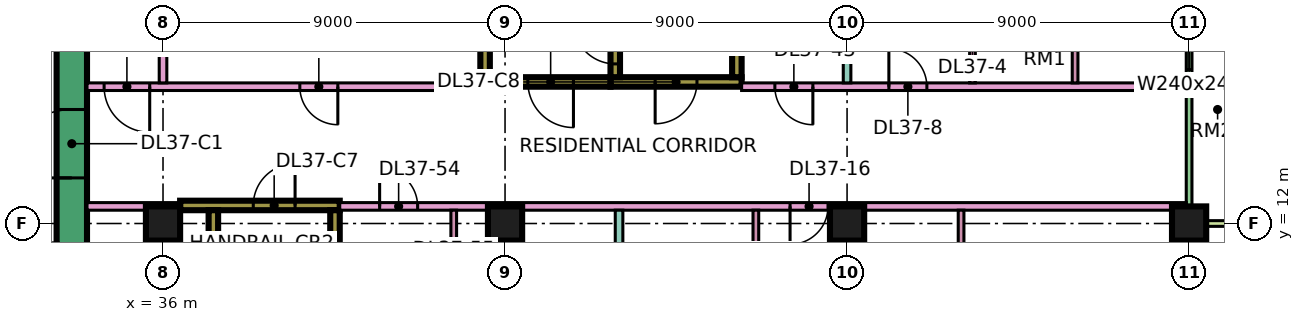
"""IFC4 building model, lengths in metres.
Left out: names, types, materials, properties, quantities, classifications, styles, units other than length and angle.
Written with IfcOpenShell. Run it as: python <this file> out.ifc"""

import sys

from ifc_helpers import new_model, si_unit, direction, frame, frame_2d, origin, origin_2d, place, context, subcontext, project, spatial, rectangle, extrude, element, fill, save


model = new_model("IFC4")
c1 = context("Model", 3, precision=1e-05, world=origin(), true_north=direction((0.0, 1.0)))
c2 = subcontext(c1, "Body", "Model", "MODEL_VIEW")
j1 = project(units=[si_unit("LENGTHUNIT", "METRE"), si_unit("PLANEANGLEUNIT", "RADIAN")], contexts=[c1])
p1 = place(None, origin())
s1 = spatial("IfcSite", under=j1, at=p1, CompositionType="ELEMENT")
p2 = place(p1, origin())
s2 = spatial("IfcBuilding", under=s1, at=p2, CompositionType="ELEMENT")
p3 = place(p2, frame((0.0, 0.0, 164.9)))
s3 = spatial("IfcBuildingStorey", under=s2, at=p3, CompositionType="ELEMENT", Elevation=164.9)
for number, where, z_axis, x_axis in (
    (1, (36.0, 12.0, 0.0), (0.0, 0.0, 1.0), (1.0, 0.0, 0.0)),
    (2, (45.0, 12.0, 0.0), (0.0, 0.0, 1.0), (1.0, 0.0, 0.0)),
    (3, (54.0, 12.0, 0.0), (0.0, 0.0, 1.0), (1.0, 0.0, 0.0)),
    (4, (63.0, 12.0, 0.0), (0.0, 0.0, 1.0), (1.0, 0.0, 0.0)),
):
    element("IfcColumn", number, at=place(p3, frame(where, z_axis=z_axis, x_axis=x_axis)), inside=s3, PredefinedType="COLUMN", context=c2, shape_type="SweptSolid", body=[
        extrude(rectangle(XDim=0.9, YDim=0.9, at=origin_2d()), origin(), (0.0, 0.0, 1.0), 3.75),
    ])
p4 = place(p3, frame((33.6, 7.8, 0.0), z_axis=(0.0, 0.0, 1.0), x_axis=(0.0, 1.0, 0.0)))
e5 = element("IfcWall", 5, at=p4, inside=s3, PredefinedType="SHEAR", context=c2, shape_type="SweptSolid", body=[
    extrude(rectangle(XDim=11.4, YDim=0.8, at=frame_2d((5.7, 0.0))), origin(), (0.0, 0.0, 1.0), 3.75),
])
p5 = place(p4, frame((5.4, 0.0, 0.0)))
e6 = element("IfcOpeningElement", 6, at=p5, cuts=e5, PredefinedType="OPENING", context=c2, shape_type="SweptSolid", body=[
    extrude(rectangle(XDim=1.8, YDim=2.4, at=frame_2d((0.9, 1.2))), frame((0.0, 0.41, 0.0), z_axis=(0.0, -1.0, 0.0), x_axis=(1.0, 0.0, 0.0)), (0.0, 0.0, 1.0), 0.82),
])
p6 = place(p3, frame((36.45, 12.475, 0.0), z_axis=(0.0, 0.0, 1.0), x_axis=(1.0, 0.0, 0.0)))
e7 = element("IfcWall", 7, at=p6, inside=s3, PredefinedType="SHEAR", context=c2, shape_type="SweptSolid", body=[
    extrude(rectangle(XDim=4.2, YDim=0.25, at=frame_2d((2.1, 0.0))), origin(), (0.0, 0.0, 1.0), 3.75),
])
p7 = place(p6, frame((1.925, 0.0, 0.0)))
e8 = element("IfcOpeningElement", 8, at=p7, cuts=e7, PredefinedType="OPENING", context=c2, shape_type="SweptSolid", body=[
    extrude(rectangle(XDim=1.1, YDim=2.2, at=frame_2d((0.55, 1.1))), frame((0.0, 0.135, 0.0), z_axis=(0.0, -1.0, 0.0), x_axis=(1.0, 0.0, 0.0)), (0.0, 0.0, 1.0), 0.27),
])
for number, where, z_axis, x_axis in (
    (9, (37.325, 5.85, 0.0), (0.0, 0.0, 1.0), (0.0, 1.0, 0.0)),
    (10, (40.525, 5.85, 0.0), (0.0, 0.0, 1.0), (0.0, 1.0, 0.0)),
):
    element("IfcWall", number, at=place(p3, frame(where, z_axis=z_axis, x_axis=x_axis)), inside=s3, PredefinedType="SHEAR", context=c2, shape_type="SweptSolid", body=[
        extrude(rectangle(XDim=6.5, YDim=0.25, at=frame_2d((3.25, 0.0))), origin(), (0.0, 0.0, 1.0), 3.75),
    ])
p8 = place(p3, frame((47.775, 15.725, 0.0), z_axis=(0.0, 0.0, 1.0), x_axis=(1.0, 0.0, 0.0)))
e11 = element("IfcWall", 11, at=p8, inside=s3, PredefinedType="SHEAR", context=c2, shape_type="SweptSolid", body=[
    extrude(rectangle(XDim=3.45, YDim=0.25, at=frame_2d((1.725, 0.0))), origin(), (0.0, 0.0, 1.0), 3.75),
])
p9 = place(p8, frame((1.175, 0.0, 0.0)))
e12 = element("IfcOpeningElement", 12, at=p9, cuts=e11, PredefinedType="OPENING", context=c2, shape_type="SweptSolid", body=[
    extrude(rectangle(XDim=1.1, YDim=2.2, at=frame_2d((0.55, 1.1))), frame((0.0, 0.135, 0.0), z_axis=(0.0, -1.0, 0.0), x_axis=(1.0, 0.0, 0.0)), (0.0, 0.0, 1.0), 0.27),
])
p10 = place(p3, frame((47.9, 15.85, 0.0), z_axis=(0.0, 0.0, 1.0), x_axis=(0.0, 1.0, 0.0)))
e13 = element("IfcWall", 13, at=p10, inside=s3, PredefinedType="SHEAR", context=c2, shape_type="SweptSolid", body=[
    extrude(rectangle(XDim=6.5, YDim=0.25, at=frame_2d((3.25, 0.0))), origin(), (0.0, 0.0, 1.0), 3.75),
])
p11 = place(p10, frame((0.35, 0.0, 0.0)))
e14 = element("IfcOpeningElement", 14, at=p11, cuts=e13, PredefinedType="OPENING", context=c2, shape_type="SweptSolid", body=[
    extrude(rectangle(XDim=1.1, YDim=2.2, at=frame_2d((0.55, 1.1))), frame((0.0, 0.135, 0.0), z_axis=(0.0, -1.0, 0.0), x_axis=(1.0, 0.0, 0.0)), (0.0, 0.0, 1.0), 0.27),
])
p12 = place(p3, frame((51.1, 15.85, 0.0), z_axis=(0.0, 0.0, 1.0), x_axis=(0.0, 1.0, 0.0)))
e15 = element("IfcWall", 15, at=p12, inside=s3, PredefinedType="SHEAR", context=c2, shape_type="SweptSolid", body=[
    extrude(rectangle(XDim=6.5, YDim=0.25, at=frame_2d((3.25, 0.0))), origin(), (0.0, 0.0, 1.0), 3.75),
])
p13 = place(p3, frame((44.35, 15.725, 0.0), z_axis=(0.0, 0.0, 1.0), x_axis=(1.0, 0.0, 0.0)))
e16 = element("IfcWall", 16, at=p13, inside=s3, PredefinedType="SHEAR", context=c2, shape_type="SweptSolid", body=[
    extrude(rectangle(XDim=3.425, YDim=0.25, at=frame_2d((1.712, 0.0))), origin(), (0.0, 0.0, 1.0), 3.75),
])
p14 = place(p13, frame((1.25, 0.0, 0.0)))
e17 = element("IfcOpeningElement", 17, at=p14, cuts=e16, PredefinedType="OPENING", context=c2, shape_type="SweptSolid", body=[
    extrude(rectangle(XDim=1.2, YDim=2.2, at=frame_2d((0.6, 1.1))), frame((0.0, 0.135, 0.0), z_axis=(0.0, -1.0, 0.0), x_axis=(1.0, 0.0, 0.0)), (0.0, 0.0, 1.0), 0.27),
])
p15 = place(p3, frame((44.475, 15.85, 0.0), z_axis=(0.0, 0.0, 1.0), x_axis=(0.0, 1.0, 0.0)))
e18 = element("IfcWall", 18, at=p15, inside=s3, PredefinedType="SHEAR", context=c2, shape_type="SweptSolid", body=[
    extrude(rectangle(XDim=6.5, YDim=0.25, at=frame_2d((3.25, 0.0))), origin(), (0.0, 0.0, 1.0), 3.75),
])
p16 = place(p15, frame((1.75, 0.0, 0.0)))
e19 = element("IfcOpeningElement", 19, at=p16, cuts=e18, PredefinedType="OPENING", context=c2, shape_type="SweptSolid", body=[
    extrude(rectangle(XDim=1.1, YDim=2.2, at=frame_2d((0.55, 1.1))), frame((0.0, 0.135, 0.0), z_axis=(0.0, -1.0, 0.0), x_axis=(1.0, 0.0, 0.0)), (0.0, 0.0, 1.0), 0.27),
])
p17 = place(p15, frame((4.3, 0.0, 0.0)))
e20 = element("IfcOpeningElement", 20, at=p17, cuts=e18, PredefinedType="OPENING", context=c2, shape_type="SweptSolid", body=[
    extrude(rectangle(XDim=1.1, YDim=2.2, at=frame_2d((0.55, 1.1))), frame((0.0, 0.135, 0.0), z_axis=(0.0, -1.0, 0.0), x_axis=(1.0, 0.0, 0.0)), (0.0, 0.0, 1.0), 0.27),
])
p18 = place(p3, frame((63.0, 12.075, 0.0), z_axis=(0.0, 0.0, 1.0), x_axis=(0.0, 1.0, 0.0)))
e21 = element("IfcWall", 21, at=p18, inside=s3, PredefinedType="SOLIDWALL", context=c2, shape_type="SweptSolid", body=[
    extrude(rectangle(XDim=10.35, YDim=0.15, at=frame_2d((5.175, 0.0))), origin(), (0.0, 0.0, 1.0), 3.35),
])
p19 = place(p18, frame((3.975, 0.0, 0.45)))
e22 = element("IfcOpeningElement", 22, at=p19, cuts=e21, PredefinedType="OPENING", context=c2, shape_type="SweptSolid", body=[
    extrude(rectangle(XDim=2.4, YDim=2.4, at=frame_2d((1.2, 1.2))), frame((0.0, 0.085, 0.0), z_axis=(0.0, -1.0, 0.0), x_axis=(1.0, 0.0, 0.0)), (0.0, 0.0, 1.0), 0.17),
])
p20 = place(p18, frame((8.587, 0.0, 0.45)))
e23 = element("IfcOpeningElement", 23, at=p20, cuts=e21, PredefinedType="OPENING", context=c2, shape_type="SweptSolid", body=[
    extrude(rectangle(XDim=1.2, YDim=2.4, at=frame_2d((0.6, 1.2))), frame((0.0, 0.085, 0.0), z_axis=(0.0, -1.0, 0.0), x_axis=(1.0, 0.0, 0.0)), (0.0, 0.0, 1.0), 0.17),
])
p21 = place(p3, frame((64.5, 12.0, 0.0), z_axis=(0.0, 0.0, 1.0), x_axis=(-1.0, 0.0, 0.0)))
e24 = element("IfcWall", 24, at=p21, inside=s3, PredefinedType="SOLIDWALL", context=c2, shape_type="SweptSolid", body=[
    extrude(rectangle(XDim=1.5, YDim=0.15, at=frame_2d((0.75, 0.0))), origin(), (0.0, 0.0, 1.0), 3.35),
])
p22 = place(p3, frame((34.0, 12.45, 0.0), z_axis=(0.0, 0.0, 1.0), x_axis=(1.0, 0.0, 0.0)))
e25 = element("IfcWall", 25, at=p22, inside=s3, PredefinedType="PARTITIONING", context=c2, shape_type="SweptSolid", body=[
    extrude(rectangle(XDim=2.451, YDim=0.2, at=frame_2d((1.226, 0.0))), origin(), (0.0, 0.0, 1.0), 3.35),
])
p23 = place(p3, frame((34.0, 15.6, 0.0), z_axis=(0.0, 0.0, 1.0), x_axis=(1.0, 0.0, 0.0)))
e26 = element("IfcWall", 26, at=p23, inside=s3, PredefinedType="PARTITIONING", context=c2, shape_type="SweptSolid", body=[
    extrude(rectangle(XDim=10.35, YDim=0.2, at=frame_2d((5.175, 0.0))), origin(), (0.0, 0.0, 1.0), 3.35),
])
p24 = place(p23, frame((5.6, 0.0, 0.0)))
e27 = element("IfcOpeningElement", 27, at=p24, cuts=e26, PredefinedType="OPENING", context=c2, shape_type="SweptSolid", body=[
    extrude(rectangle(XDim=1.0, YDim=2.1, at=frame_2d((0.5, 1.05))), frame((0.0, 0.11, 0.0), z_axis=(0.0, -1.0, 0.0), x_axis=(1.0, 0.0, 0.0)), (0.0, 0.0, 1.0), 0.22),
])
p25 = place(p23, frame((0.45, 0.0, 0.0)))
e28 = element("IfcOpeningElement", 28, at=p25, cuts=e26, PredefinedType="OPENING", context=c2, shape_type="SweptSolid", body=[
    extrude(rectangle(XDim=1.2, YDim=2.1, at=frame_2d((0.6, 1.05))), frame((0.0, 0.11, 0.0), z_axis=(0.0, -1.0, 0.0), x_axis=(1.0, 0.0, 0.0)), (0.0, 0.0, 1.0), 0.22),
])
p26 = place(p3, frame((36.0, 15.7, 0.0), z_axis=(0.0, 0.0, 1.0), x_axis=(0.0, 1.0, 0.0)))
e29 = element("IfcWall", 29, at=p26, inside=s3, PredefinedType="PARTITIONING", context=c2, shape_type="SweptSolid", body=[
    extrude(rectangle(XDim=8.3, YDim=0.2, at=frame_2d((4.15, 0.0))), origin(), (0.0, 0.0, 1.0), 3.35),
])
p27 = place(p3, frame((40.65, 12.45, 0.0), z_axis=(0.0, 0.0, 1.0), x_axis=(1.0, 0.0, 0.0)))
e30 = element("IfcWall", 30, at=p27, inside=s3, PredefinedType="PARTITIONING", context=c2, shape_type="SweptSolid", body=[
    extrude(rectangle(XDim=22.276, YDim=0.2, at=frame_2d((11.138, 0.0))), origin(), (0.0, 0.0, 1.0), 3.35),
])
p28 = place(p27, frame((11.85, 0.0, 0.0)))
e31 = element("IfcOpeningElement", 31, at=p28, cuts=e30, PredefinedType="OPENING", context=c2, shape_type="SweptSolid", body=[
    extrude(rectangle(XDim=1.0, YDim=2.1, at=frame_2d((0.5, 1.05))), frame((0.0, 0.11, 0.0), z_axis=(0.0, -1.0, 0.0), x_axis=(1.0, 0.0, 0.0)), (0.0, 0.0, 1.0), 0.22),
])
p29 = place(p27, frame((1.05, 0.0, 0.0)))
e32 = element("IfcOpeningElement", 32, at=p29, cuts=e30, PredefinedType="OPENING", context=c2, shape_type="SweptSolid", body=[
    extrude(rectangle(XDim=1.0, YDim=2.1, at=frame_2d((0.5, 1.05))), frame((0.0, 0.11, 0.0), z_axis=(0.0, -1.0, 0.0), x_axis=(1.0, 0.0, 0.0)), (0.0, 0.0, 1.0), 0.22),
])
p30 = place(p3, frame((43.65, 5.825, 0.0), z_axis=(0.0, 0.0, 1.0), x_axis=(0.0, 1.0, 0.0)))
e33 = element("IfcWall", 33, at=p30, inside=s3, PredefinedType="PARTITIONING", context=c2, shape_type="SweptSolid", body=[
    extrude(rectangle(XDim=6.525, YDim=0.15, at=frame_2d((3.263, 0.0))), origin(), (0.0, 0.0, 1.0), 3.35),
])
p31 = place(p30, frame((4.425, 0.0, 0.0)))
e34 = element("IfcOpeningElement", 34, at=p31, cuts=e33, PredefinedType="OPENING", context=c2, shape_type="SweptSolid", body=[
    extrude(rectangle(XDim=0.9, YDim=2.1, at=frame_2d((0.45, 1.05))), frame((0.0, 0.085, 0.0), z_axis=(0.0, -1.0, 0.0), x_axis=(1.0, 0.0, 0.0)), (0.0, 0.0, 1.0), 0.17),
])
p32 = place(p3, frame((48.0, 0.0, 0.0), z_axis=(0.0, 0.0, 1.0), x_axis=(0.0, 1.0, 0.0)))
e35 = element("IfcWall", 35, at=p32, inside=s3, PredefinedType="PARTITIONING", context=c2, shape_type="SweptSolid", body=[
    extrude(rectangle(XDim=12.35, YDim=0.2, at=frame_2d((6.175, 0.0))), origin(), (0.0, 0.0, 1.0), 3.35),
])
p33 = place(p3, frame((51.225, 15.6, 0.0), z_axis=(0.0, 0.0, 1.0), x_axis=(1.0, 0.0, 0.0)))
e36 = element("IfcWall", 36, at=p33, inside=s3, PredefinedType="PARTITIONING", context=c2, shape_type="SweptSolid", body=[
    extrude(rectangle(XDim=11.701, YDim=0.2, at=frame_2d((5.851, 0.0))), origin(), (0.0, 0.0, 1.0), 3.35),
])
p34 = place(p33, frame((3.875, 0.0, 0.0)))
e37 = element("IfcOpeningElement", 37, at=p34, cuts=e36, PredefinedType="OPENING", context=c2, shape_type="SweptSolid", body=[
    extrude(rectangle(XDim=1.0, YDim=2.1, at=frame_2d((0.5, 1.05))), frame((0.0, 0.11, 0.0), z_axis=(0.0, -1.0, 0.0), x_axis=(1.0, 0.0, 0.0)), (0.0, 0.0, 1.0), 0.22),
])
p35 = place(p33, frame((0.875, 0.0, 0.0)))
e38 = element("IfcOpeningElement", 38, at=p35, cuts=e36, PredefinedType="OPENING", context=c2, shape_type="SweptSolid", body=[
    extrude(rectangle(XDim=1.0, YDim=2.1, at=frame_2d((0.5, 1.05))), frame((0.0, 0.11, 0.0), z_axis=(0.0, -1.0, 0.0), x_axis=(1.0, 0.0, 0.0)), (0.0, 0.0, 1.0), 0.22),
])
p36 = place(p3, frame((51.6, 7.575, 0.0), z_axis=(0.0, 0.0, 1.0), x_axis=(0.0, 1.0, 0.0)))
e39 = element("IfcWall", 39, at=p36, inside=s3, PredefinedType="PARTITIONING", context=c2, shape_type="SweptSolid", body=[
    extrude(rectangle(XDim=4.775, YDim=0.15, at=frame_2d((2.388, 0.0))), origin(), (0.0, 0.0, 1.0), 3.35),
])
p37 = place(p36, frame((2.125, 0.0, 0.0)))
e40 = element("IfcOpeningElement", 40, at=p37, cuts=e39, PredefinedType="OPENING", context=c2, shape_type="SweptSolid", body=[
    extrude(rectangle(XDim=0.8, YDim=2.1, at=frame_2d((0.4, 1.05))), frame((0.0, 0.085, 0.0), z_axis=(0.0, -1.0, 0.0), x_axis=(1.0, 0.0, 0.0)), (0.0, 0.0, 1.0), 0.17),
])
p38 = place(p3, frame((54.0, 15.7, 0.0), z_axis=(0.0, 0.0, 1.0), x_axis=(0.0, 1.0, 0.0)))
e41 = element("IfcWall", 41, at=p38, inside=s3, PredefinedType="PARTITIONING", context=c2, shape_type="SweptSolid", body=[
    extrude(rectangle(XDim=8.3, YDim=0.2, at=frame_2d((4.15, 0.0))), origin(), (0.0, 0.0, 1.0), 3.35),
])
p39 = place(p3, frame((54.3, 7.725, 0.0), z_axis=(0.0, 0.0, 1.0), x_axis=(0.0, 1.0, 0.0)))
e42 = element("IfcWall", 42, at=p39, inside=s3, PredefinedType="PARTITIONING", context=c2, shape_type="SweptSolid", body=[
    extrude(rectangle(XDim=4.625, YDim=0.15, at=frame_2d((2.312, 0.0))), origin(), (0.0, 0.0, 1.0), 3.35),
])
p40 = place(p39, frame((1.875, 0.0, 0.0)))
e43 = element("IfcOpeningElement", 43, at=p40, cuts=e42, PredefinedType="OPENING", context=c2, shape_type="SweptSolid", body=[
    extrude(rectangle(XDim=0.8, YDim=2.1, at=frame_2d((0.4, 1.05))), frame((0.0, 0.085, 0.0), z_axis=(0.0, -1.0, 0.0), x_axis=(1.0, 0.0, 0.0)), (0.0, 0.0, 1.0), 0.17),
])
p41 = place(p3, frame((57.0, 7.725, 0.0), z_axis=(0.0, 0.0, 1.0), x_axis=(0.0, 1.0, 0.0)))
e44 = element("IfcWall", 44, at=p41, inside=s3, PredefinedType="PARTITIONING", context=c2, shape_type="SweptSolid", body=[
    extrude(rectangle(XDim=4.625, YDim=0.15, at=frame_2d((2.312, 0.0))), origin(), (0.0, 0.0, 1.0), 3.35),
])
p42 = place(p3, frame((57.3, 15.7, 0.0), z_axis=(0.0, 0.0, 1.0), x_axis=(0.0, 1.0, 0.0)))
e45 = element("IfcWall", 45, at=p42, inside=s3, PredefinedType="PARTITIONING", context=c2, shape_type="SweptSolid", body=[
    extrude(rectangle(XDim=3.125, YDim=0.15, at=frame_2d((1.562, 0.0))), origin(), (0.0, 0.0, 1.0), 3.35),
])
p43 = place(p42, frame((1.1, 0.0, 0.0)))
e46 = element("IfcOpeningElement", 46, at=p43, cuts=e45, PredefinedType="OPENING", context=c2, shape_type="SweptSolid", body=[
    extrude(rectangle(XDim=0.8, YDim=2.1, at=frame_2d((0.4, 1.05))), frame((0.0, 0.085, 0.0), z_axis=(0.0, -1.0, 0.0), x_axis=(1.0, 0.0, 0.0)), (0.0, 0.0, 1.0), 0.17),
])
p44 = place(p3, frame((60.0, 15.7, 0.0), z_axis=(0.0, 0.0, 1.0), x_axis=(0.0, 1.0, 0.0)))
e47 = element("IfcWall", 47, at=p44, inside=s3, PredefinedType="PARTITIONING", context=c2, shape_type="SweptSolid", body=[
    extrude(rectangle(XDim=3.125, YDim=0.15, at=frame_2d((1.562, 0.0))), origin(), (0.0, 0.0, 1.0), 3.35),
])
p45 = place(p19, origin())
e48 = element("IfcWindow", 48, at=p45, inside=s3, PartitioningType="SINGLE_PANEL", PredefinedType="WINDOW", context=c2, shape_type="SweptSolid", body=[
    extrude(rectangle(XDim=2.4, YDim=2.4, at=frame_2d((1.2, 1.2))), frame((0.0, 0.03, 0.0), z_axis=(0.0, -1.0, 0.0), x_axis=(1.0, 0.0, 0.0)), (0.0, 0.0, 1.0), 0.06),
])
fill(e22, e48)
p46 = place(p5, origin())
e49 = element("IfcDoor", 49, at=p46, inside=s3, OperationType="DOUBLE_DOOR_SINGLE_SWING", PredefinedType="DOOR", context=c2, shape_type="SweptSolid", body=[
    extrude(rectangle(XDim=1.8, YDim=2.4, at=frame_2d((0.9, 1.2))), frame((0.0, 0.025, 0.0), z_axis=(0.0, -1.0, 0.0), x_axis=(1.0, 0.0, 0.0)), (0.0, 0.0, 1.0), 0.05),
])
fill(e6, e49)
p47 = place(p7, frame((1.1, 0.0, 0.0), z_axis=(0.0, 0.0, 1.0), x_axis=(-1.0, 0.0, 0.0)))
e50 = element("IfcDoor", 50, at=p47, inside=s3, OperationType="SINGLE_SWING_RIGHT", PredefinedType="DOOR", context=c2, shape_type="SweptSolid", body=[
    extrude(rectangle(XDim=1.1, YDim=2.2, at=frame_2d((0.55, 1.1))), frame((0.0, 0.025, 0.0), z_axis=(0.0, -1.0, 0.0), x_axis=(1.0, 0.0, 0.0)), (0.0, 0.0, 1.0), 0.05),
])
fill(e8, e50)
p48 = place(p9, frame((1.1, 0.0, 0.0), z_axis=(0.0, 0.0, 1.0), x_axis=(-1.0, 0.0, 0.0)))
e51 = element("IfcDoor", 51, at=p48, inside=s3, OperationType="SINGLE_SWING_LEFT", PredefinedType="DOOR", context=c2, shape_type="SweptSolid", body=[
    extrude(rectangle(XDim=1.1, YDim=2.2, at=frame_2d((0.55, 1.1))), frame((0.0, 0.025, 0.0), z_axis=(0.0, -1.0, 0.0), x_axis=(1.0, 0.0, 0.0)), (0.0, 0.0, 1.0), 0.05),
])
fill(e12, e51)
p49 = place(p14, origin())
e52 = element("IfcDoor", 52, at=p49, inside=s3, OperationType="SINGLE_SWING_RIGHT", PredefinedType="DOOR", context=c2, shape_type="SweptSolid", body=[
    extrude(rectangle(XDim=1.2, YDim=2.2, at=frame_2d((0.6, 1.1))), frame((0.0, 0.025, 0.0), z_axis=(0.0, -1.0, 0.0), x_axis=(1.0, 0.0, 0.0)), (0.0, 0.0, 1.0), 0.05),
])
fill(e17, e52)
p50 = place(p11, frame((1.1, 0.0, 0.0), z_axis=(0.0, 0.0, 1.0), x_axis=(-1.0, 0.0, 0.0)))
e53 = element("IfcDoor", 53, at=p50, inside=s3, OperationType="SINGLE_SWING_RIGHT", PredefinedType="DOOR", context=c2, shape_type="SweptSolid", body=[
    extrude(rectangle(XDim=1.1, YDim=2.2, at=frame_2d((0.55, 1.1))), frame((0.0, 0.025, 0.0), z_axis=(0.0, -1.0, 0.0), x_axis=(1.0, 0.0, 0.0)), (0.0, 0.0, 1.0), 0.05),
])
fill(e14, e53)
p51 = place(p24, origin())
e54 = element("IfcDoor", 54, at=p51, inside=s3, OperationType="SINGLE_SWING_RIGHT", PredefinedType="DOOR", context=c2, shape_type="SweptSolid", body=[
    extrude(rectangle(XDim=1.0, YDim=2.1, at=frame_2d((0.5, 1.05))), frame((0.0, 0.025, 0.0), z_axis=(0.0, -1.0, 0.0), x_axis=(1.0, 0.0, 0.0)), (0.0, 0.0, 1.0), 0.05),
])
fill(e27, e54)
p52 = place(p34, origin())
e55 = element("IfcDoor", 55, at=p52, inside=s3, OperationType="SINGLE_SWING_LEFT", PredefinedType="DOOR", context=c2, shape_type="SweptSolid", body=[
    extrude(rectangle(XDim=1.0, YDim=2.1, at=frame_2d((0.5, 1.05))), frame((0.0, 0.025, 0.0), z_axis=(0.0, -1.0, 0.0), x_axis=(1.0, 0.0, 0.0)), (0.0, 0.0, 1.0), 0.05),
])
fill(e37, e55)
p53 = place(p28, frame((1.0, 0.0, 0.0), z_axis=(0.0, 0.0, 1.0), x_axis=(-1.0, 0.0, 0.0)))
e56 = element("IfcDoor", 56, at=p53, inside=s3, OperationType="SINGLE_SWING_LEFT", PredefinedType="DOOR", context=c2, shape_type="SweptSolid", body=[
    extrude(rectangle(XDim=1.0, YDim=2.1, at=frame_2d((0.5, 1.05))), frame((0.0, 0.025, 0.0), z_axis=(0.0, -1.0, 0.0), x_axis=(1.0, 0.0, 0.0)), (0.0, 0.0, 1.0), 0.05),
])
fill(e31, e56)
p54 = place(p25, origin())
e57 = element("IfcDoor", 57, at=p54, inside=s3, OperationType="SINGLE_SWING_RIGHT", PredefinedType="DOOR", context=c2, shape_type="SweptSolid", body=[
    extrude(rectangle(XDim=1.2, YDim=2.1, at=frame_2d((0.6, 1.05))), frame((0.0, 0.025, 0.0), z_axis=(0.0, -1.0, 0.0), x_axis=(1.0, 0.0, 0.0)), (0.0, 0.0, 1.0), 0.05),
])
fill(e28, e57)
p55 = place(p35, origin())
e58 = element("IfcDoor", 58, at=p55, inside=s3, OperationType="SINGLE_SWING_RIGHT", PredefinedType="DOOR", context=c2, shape_type="SweptSolid", body=[
    extrude(rectangle(XDim=1.0, YDim=2.1, at=frame_2d((0.5, 1.05))), frame((0.0, 0.025, 0.0), z_axis=(0.0, -1.0, 0.0), x_axis=(1.0, 0.0, 0.0)), (0.0, 0.0, 1.0), 0.05),
])
fill(e38, e58)
p56 = place(p29, origin())
e59 = element("IfcDoor", 59, at=p56, inside=s3, OperationType="SINGLE_SWING_LEFT", PredefinedType="DOOR", context=c2, shape_type="SweptSolid", body=[
    extrude(rectangle(XDim=1.0, YDim=2.1, at=frame_2d((0.5, 1.05))), frame((0.0, 0.025, 0.0), z_axis=(0.0, -1.0, 0.0), x_axis=(1.0, 0.0, 0.0)), (0.0, 0.0, 1.0), 0.05),
])
fill(e32, e59)
save(model, sys.argv[1])
